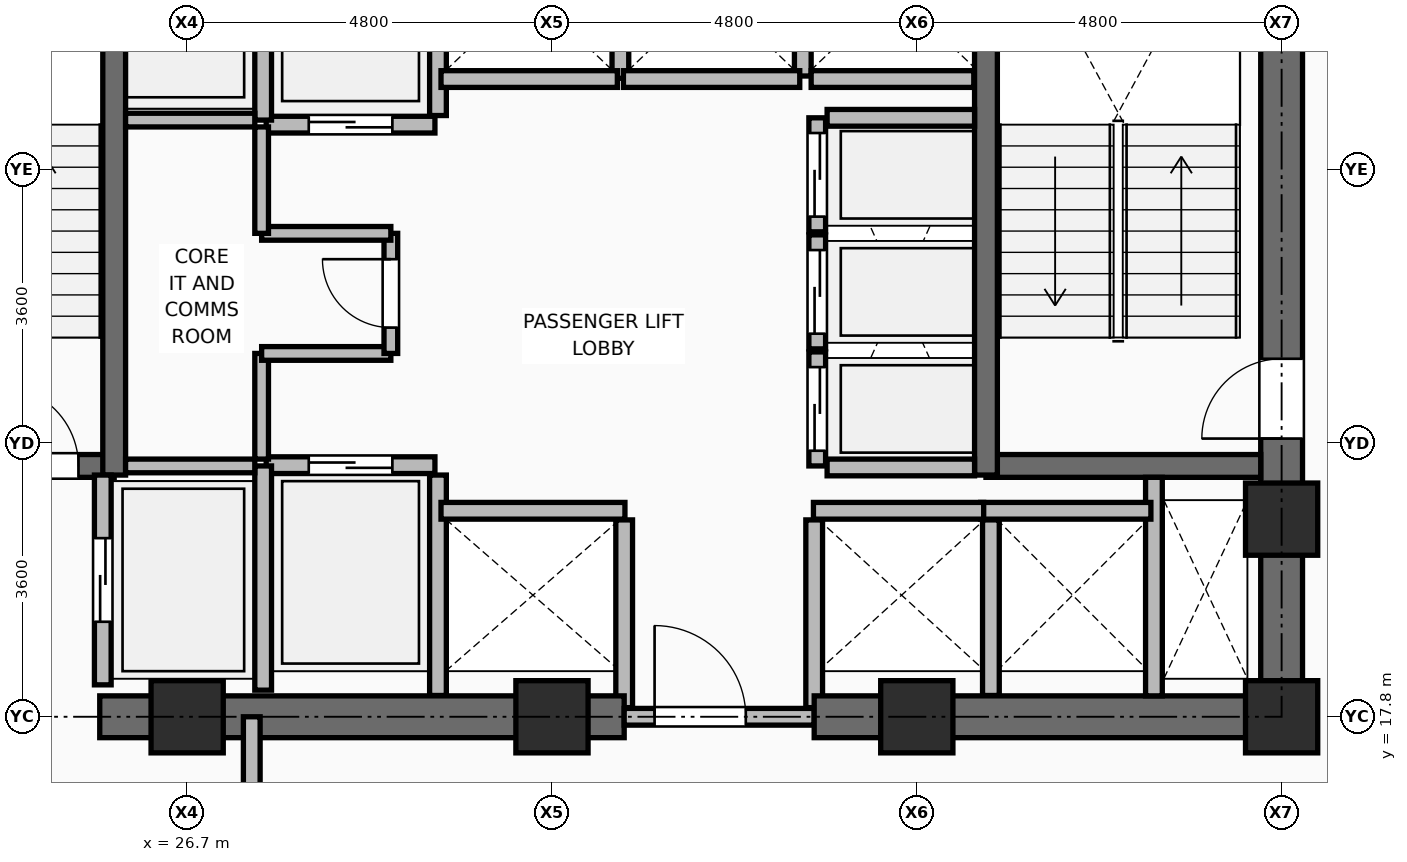
"""IFC4 building model, lengths in metres.
Left out: names, types, materials, properties, quantities, classifications, styles, units other than length and angle.
Written with IfcOpenShell. Run it as: python <this file> out.ifc"""

import sys

from ifc_helpers import new_model, si_unit, direction, frame, frame_2d, origin, origin_2d, place, context, subcontext, project, spatial, rectangle, extrude, element, fill, save


model = new_model("IFC4")
c1 = context("Model", 3, precision=1e-05, world=origin(), true_north=direction((0.0, 1.0)))
c2 = subcontext(c1, "Body", "Model", "MODEL_VIEW")
j1 = project(units=[si_unit("LENGTHUNIT", "METRE"), si_unit("PLANEANGLEUNIT", "RADIAN")], contexts=[c1])
p1 = place(None, origin())
s1 = spatial("IfcSite", under=j1, at=p1, CompositionType="ELEMENT")
p2 = place(p1, origin())
s2 = spatial("IfcBuilding", under=s1, at=p2, CompositionType="ELEMENT")
p3 = place(p2, frame((0.0, 0.0, 168.45)))
s3 = spatial("IfcBuildingStorey", under=s2, at=p3, CompositionType="ELEMENT", Elevation=168.45)
for number, where, z_axis, x_axis in (
    (1, (26.7, 17.8, 0.0), (0.0, 0.0, 1.0), (1.0, 0.0, 0.0)),
    (2, (31.5, 17.8, 0.0), (0.0, 0.0, 1.0), (1.0, 0.0, 0.0)),
    (3, (36.3, 17.8, 0.0), (0.0, 0.0, 1.0), (1.0, 0.0, 0.0)),
    (4, (41.1, 17.8, 0.0), (0.0, 0.0, 1.0), (1.0, 0.0, 0.0)),
    (5, (41.1, 20.4, 0.0), (0.0, 0.0, 1.0), (1.0, 0.0, 0.0)),
):
    element("IfcColumn", number, at=place(p3, frame(where, z_axis=z_axis, x_axis=x_axis)), inside=s3, PredefinedType="COLUMN", context=c2, shape_type="SweptSolid", body=[
        extrude(rectangle(XDim=0.95, YDim=0.95, at=origin_2d()), origin(), (0.0, 0.0, 1.0), 3.75),
    ])
p4 = place(p3, frame((30.0, 18.08, 0.0), z_axis=(0.0, 0.0, 1.0), x_axis=(0.0, 1.0, 0.0)))
e6 = element("IfcWall", 6, at=p4, inside=s3, PredefinedType="PARTITIONING", context=c2, shape_type="SweptSolid", body=[
    extrude(rectangle(XDim=2.9, YDim=0.22, at=frame_2d((1.45, 0.0))), origin(), (0.0, 0.0, 1.0), 3.545),
])
for number, where, z_axis, x_axis in (
    (7, (32.45, 17.92, 0.0), (0.0, 0.0, 1.0), (0.0, 1.0, 0.0)),
    (8, (34.95, 17.92, 0.0), (0.0, 0.0, 1.0), (0.0, 1.0, 0.0)),
):
    element("IfcWall", number, at=place(p3, frame(where, z_axis=z_axis, x_axis=x_axis)), inside=s3, PredefinedType="PARTITIONING", context=c2, shape_type="SweptSolid", body=[
        extrude(rectangle(XDim=2.47, YDim=0.22, at=frame_2d((1.235, 0.0))), origin(), (0.0, 0.0, 1.0), 3.006),
    ])
p5 = place(p3, frame((37.275, 18.08, 0.0), z_axis=(0.0, 0.0, 1.0), x_axis=(0.0, 1.0, 0.0)))
e9 = element("IfcWall", 9, at=p5, inside=s3, PredefinedType="PARTITIONING", context=c2, shape_type="SweptSolid", body=[
    extrude(rectangle(XDim=2.31, YDim=0.22, at=frame_2d((1.155, 0.0))), origin(), (0.0, 0.0, 1.0), 3.545),
])
p6 = place(p3, frame((30.0, 25.71, 0.0), z_axis=(0.0, 0.0, 1.0), x_axis=(0.0, 1.0, 0.0)))
e10 = element("IfcWall", 10, at=p6, inside=s3, PredefinedType="PARTITIONING", context=c2, shape_type="SweptSolid", body=[
    extrude(rectangle(XDim=2.73, YDim=0.22, at=frame_2d((1.365, 0.0))), origin(), (0.0, 0.0, 1.0), 3.545),
])
p7 = place(p3, frame((32.4, 26.2, 0.0), z_axis=(0.0, 0.0, 1.0), x_axis=(0.0, 1.0, 0.0)))
e11 = element("IfcWall", 11, at=p7, inside=s3, PredefinedType="PARTITIONING", context=c2, shape_type="SweptSolid", body=[
    extrude(rectangle(XDim=2.24, YDim=0.22, at=frame_2d((1.12, 0.0))), origin(), (0.0, 0.0, 1.0), 3.545),
])
p8 = place(p3, frame((34.8, 26.23, 0.0), z_axis=(0.0, 0.0, 1.0), x_axis=(0.0, 1.0, 0.0)))
e12 = element("IfcWall", 12, at=p8, inside=s3, PredefinedType="PARTITIONING", context=c2, shape_type="SweptSolid", body=[
    extrude(rectangle(XDim=2.21, YDim=0.22, at=frame_2d((1.105, 0.0))), origin(), (0.0, 0.0, 1.0), 3.545),
])
p9 = place(p3, frame((34.91, 26.19, 0.0), z_axis=(0.0, 0.0, 1.0), x_axis=(1.0, 0.0, 0.0)))
e13 = element("IfcWall", 13, at=p9, inside=s3, PredefinedType="PARTITIONING", context=c2, shape_type="SweptSolid", body=[
    extrude(rectangle(XDim=2.14, YDim=0.22, at=frame_2d((1.07, 0.0))), origin(), (0.0, 0.0, 1.0), 3.545),
])
p10 = place(p3, frame((25.55, 17.8, 0.0), z_axis=(0.0, 0.0, 1.0), x_axis=(1.0, 0.0, 0.0)))
e14 = element("IfcWall", 14, at=p10, inside=s3, PredefinedType="SHEAR", context=c2, shape_type="SweptSolid", body=[
    extrude(rectangle(XDim=6.9, YDim=0.55, at=frame_2d((3.45, 0.0))), origin(), (0.0, 0.0, 1.0), 3.57),
])
p11 = place(p3, frame((32.45, 17.8, 0.0), z_axis=(0.0, 0.0, 1.0), x_axis=(1.0, 0.0, 0.0)))
e15 = element("IfcWall", 15, at=p11, inside=s3, PredefinedType="PARTITIONING", context=c2, shape_type="SweptSolid", body=[
    extrude(rectangle(XDim=2.5, YDim=0.22, at=frame_2d((1.25, 0.0))), origin(), (0.0, 0.0, 1.0), 3.006),
])
p12 = place(p11, frame((0.4, 0.0, 0.0)))
e16 = element("IfcOpeningElement", 16, at=p12, cuts=e15, PredefinedType="OPENING", context=c2, shape_type="SweptSolid", body=[
    extrude(rectangle(XDim=1.2, YDim=2.1, at=frame_2d((0.6, 1.05))), frame((0.0, 0.12, 0.0), z_axis=(0.0, -1.0, 0.0), x_axis=(1.0, 0.0, 0.0)), (0.0, 0.0, 1.0), 0.24),
])
p13 = place(p3, frame((34.95, 17.8, 0.0), z_axis=(0.0, 0.0, 1.0), x_axis=(1.0, 0.0, 0.0)))
e17 = element("IfcWall", 17, at=p13, inside=s3, PredefinedType="SHEAR", context=c2, shape_type="SweptSolid", body=[
    extrude(rectangle(XDim=6.425, YDim=0.55, at=frame_2d((3.212, 0.0))), origin(), (0.0, 0.0, 1.0), 3.57),
])
p14 = place(p3, frame((41.1, 18.075, 0.0), z_axis=(0.0, 0.0, 1.0), x_axis=(0.0, 1.0, 0.0)))
e18 = element("IfcWall", 18, at=p14, inside=s3, PredefinedType="SHEAR", context=c2, shape_type="SweptSolid", body=[
    extrude(rectangle(XDim=14.1, YDim=0.55, at=frame_2d((7.05, 0.0))), origin(), (0.0, 0.0, 1.0), 3.57),
])
p15 = place(p14, frame((3.385, 0.0, 0.0)))
e19 = element("IfcOpeningElement", 19, at=p15, cuts=e18, PredefinedType="OPENING", context=c2, shape_type="SweptSolid", body=[
    extrude(rectangle(XDim=1.05, YDim=2.1, at=frame_2d((0.525, 1.05))), frame((0.0, 0.285, 0.0), z_axis=(0.0, -1.0, 0.0), x_axis=(1.0, 0.0, 0.0)), (0.0, 0.0, 1.0), 0.57),
])
p16 = place(p3, frame((22.175, 21.1, 0.0), z_axis=(0.0, 0.0, 1.0), x_axis=(1.0, 0.0, 0.0)))
e20 = element("IfcWall", 20, at=p16, inside=s3, PredefinedType="SHEAR", context=c2, shape_type="SweptSolid", body=[
    extrude(rectangle(XDim=3.565, YDim=0.3, at=frame_2d((1.782, 0.0))), origin(), (0.0, 0.0, 1.0), 3.57),
])
p17 = place(p16, frame((2.045, 0.0, 0.0)))
e21 = element("IfcOpeningElement", 21, at=p17, cuts=e20, PredefinedType="OPENING", context=c2, shape_type="SweptSolid", body=[
    extrude(rectangle(XDim=1.05, YDim=2.1, at=frame_2d((0.525, 1.05))), frame((0.0, 0.16, 0.0), z_axis=(0.0, -1.0, 0.0), x_axis=(1.0, 0.0, 0.0)), (0.0, 0.0, 1.0), 0.32),
])
p18 = place(p3, frame((25.74, 20.98, 0.0), z_axis=(0.0, 0.0, 1.0), x_axis=(0.0, 1.0, 0.0)))
e22 = element("IfcWall", 22, at=p18, inside=s3, PredefinedType="SHEAR", context=c2, shape_type="SweptSolid", body=[
    extrude(rectangle(XDim=7.99, YDim=0.3, at=frame_2d((3.995, 0.0))), origin(), (0.0, 0.0, 1.0), 3.57),
])
p19 = place(p3, frame((37.21, 21.1, 0.0), z_axis=(0.0, 0.0, 1.0), x_axis=(1.0, 0.0, 0.0)))
e23 = element("IfcWall", 23, at=p19, inside=s3, PredefinedType="SHEAR", context=c2, shape_type="SweptSolid", body=[
    extrude(rectangle(XDim=3.615, YDim=0.3, at=frame_2d((1.808, 0.0))), origin(), (0.0, 0.0, 1.0), 3.57),
])
p20 = place(p3, frame((37.21, 20.98, 0.0), z_axis=(0.0, 0.0, 1.0), x_axis=(0.0, 1.0, 0.0)))
e24 = element("IfcWall", 24, at=p20, inside=s3, PredefinedType="SHEAR", context=c2, shape_type="SweptSolid", body=[
    extrude(rectangle(XDim=7.99, YDim=0.3, at=frame_2d((3.995, 0.0))), origin(), (0.0, 0.0, 1.0), 3.57),
])
p21 = place(p3, frame((39.42, 18.075, 0.0), z_axis=(0.0, 0.0, 1.0), x_axis=(0.0, 1.0, 0.0)))
e25 = element("IfcWall", 25, at=p21, inside=s3, PredefinedType="PARTITIONING", context=c2, shape_type="SweptSolid", body=[
    extrude(rectangle(XDim=2.875, YDim=0.22, at=frame_2d((1.438, 0.0))), origin(), (0.0, 0.0, 1.0), 3.55),
])
p22 = place(p3, frame((25.59, 18.22, 0.0), z_axis=(0.0, 0.0, 1.0), x_axis=(0.0, 1.0, 0.0)))
e26 = element("IfcWall", 26, at=p22, inside=s3, PredefinedType="PARTITIONING", context=c2, shape_type="SweptSolid", body=[
    extrude(rectangle(XDim=2.76, YDim=0.22, at=frame_2d((1.38, 0.0))), origin(), (0.0, 0.0, 1.0), 3.55),
])
p23 = place(p22, frame((0.83, 0.0, 0.0)))
e27 = element("IfcOpeningElement", 27, at=p23, cuts=e26, PredefinedType="OPENING", context=c2, shape_type="SweptSolid", body=[
    extrude(rectangle(XDim=1.1, YDim=2.2, at=frame_2d((0.55, 1.1))), frame((0.0, 0.12, 0.0), z_axis=(0.0, -1.0, 0.0), x_axis=(1.0, 0.0, 0.0)), (0.0, 0.0, 1.0), 0.24),
])
p24 = place(p3, frame((27.74, 21.11, 0.0), z_axis=(0.0, 0.0, 1.0), x_axis=(1.0, 0.0, 0.0)))
e28 = element("IfcWall", 28, at=p24, inside=s3, PredefinedType="PARTITIONING", context=c2, shape_type="SweptSolid", body=[
    extrude(rectangle(XDim=2.22, YDim=0.22, at=frame_2d((1.11, 0.0))), origin(), (0.0, 0.0, 1.0), 3.55),
])
p25 = place(p24, frame((0.56, 0.0, 0.0)))
e29 = element("IfcOpeningElement", 29, at=p25, cuts=e28, PredefinedType="OPENING", context=c2, shape_type="SweptSolid", body=[
    extrude(rectangle(XDim=1.1, YDim=2.2, at=frame_2d((0.55, 1.1))), frame((0.0, 0.12, 0.0), z_axis=(0.0, -1.0, 0.0), x_axis=(1.0, 0.0, 0.0)), (0.0, 0.0, 1.0), 0.24),
])
p26 = place(p3, frame((27.74, 25.59, 0.0), z_axis=(0.0, 0.0, 1.0), x_axis=(1.0, 0.0, 0.0)))
e30 = element("IfcWall", 30, at=p26, inside=s3, PredefinedType="PARTITIONING", context=c2, shape_type="SweptSolid", body=[
    extrude(rectangle(XDim=2.22, YDim=0.22, at=frame_2d((1.11, 0.0))), origin(), (0.0, 0.0, 1.0), 3.55),
])
p27 = place(p26, frame((0.56, 0.0, 0.0)))
e31 = element("IfcOpeningElement", 31, at=p27, cuts=e30, PredefinedType="OPENING", context=c2, shape_type="SweptSolid", body=[
    extrude(rectangle(XDim=1.1, YDim=2.2, at=frame_2d((0.55, 1.1))), frame((0.0, 0.12, 0.0), z_axis=(0.0, -1.0, 0.0), x_axis=(1.0, 0.0, 0.0)), (0.0, 0.0, 1.0), 0.24),
])
p28 = place(p3, frame((30.04, 20.51, 0.0), z_axis=(0.0, 0.0, 1.0), x_axis=(1.0, 0.0, 0.0)))
e32 = element("IfcWall", 32, at=p28, inside=s3, PredefinedType="PARTITIONING", context=c2, shape_type="SweptSolid", body=[
    extrude(rectangle(XDim=2.42, YDim=0.22, at=frame_2d((1.21, 0.0))), origin(), (0.0, 0.0, 1.0), 3.55),
])
for number, where, z_axis, x_axis in (
    (33, (37.14, 20.51, 0.0), (0.0, 0.0, 1.0), (1.0, 0.0, 0.0)),
    (34, (34.94, 20.51, 0.0), (0.0, 0.0, 1.0), (1.0, 0.0, 0.0)),
):
    element("IfcWall", number, at=place(p3, frame(where, z_axis=z_axis, x_axis=x_axis)), inside=s3, PredefinedType="PARTITIONING", context=c2, shape_type="SweptSolid", body=[
        extrude(rectangle(XDim=2.24, YDim=0.22, at=frame_2d((1.12, 0.0))), origin(), (0.0, 0.0, 1.0), 3.55),
    ])
for number, where, z_axis, x_axis in (
    (35, (30.04, 26.19, 0.0), (0.0, 0.0, 1.0), (1.0, 0.0, 0.0)),
    (36, (32.44, 26.19, 0.0), (0.0, 0.0, 1.0), (1.0, 0.0, 0.0)),
):
    element("IfcWall", number, at=place(p3, frame(where, z_axis=z_axis, x_axis=x_axis)), inside=s3, PredefinedType="PARTITIONING", context=c2, shape_type="SweptSolid", body=[
        extrude(rectangle(XDim=2.32, YDim=0.22, at=frame_2d((1.16, 0.0))), origin(), (0.0, 0.0, 1.0), 3.55),
    ])
p29 = place(p3, frame((34.99, 21.1, 0.0), z_axis=(0.0, 0.0, 1.0), x_axis=(0.0, 1.0, 0.0)))
e37 = element("IfcWall", 37, at=p29, inside=s3, PredefinedType="PARTITIONING", context=c2, shape_type="SweptSolid", body=[
    extrude(rectangle(XDim=1.5, YDim=0.22, at=frame_2d((0.75, 0.0))), origin(), (0.0, 0.0, 1.0), 3.55),
])
p30 = place(p29, frame((0.2, 0.0, 0.0)))
e38 = element("IfcOpeningElement", 38, at=p30, cuts=e37, PredefinedType="OPENING", context=c2, shape_type="SweptSolid", body=[
    extrude(rectangle(XDim=1.1, YDim=2.2, at=frame_2d((0.55, 1.1))), frame((0.0, 0.12, 0.0), z_axis=(0.0, -1.0, 0.0), x_axis=(1.0, 0.0, 0.0)), (0.0, 0.0, 1.0), 0.24),
])
p31 = place(p3, frame((34.99, 22.64, 0.0), z_axis=(0.0, 0.0, 1.0), x_axis=(0.0, 1.0, 0.0)))
e39 = element("IfcWall", 39, at=p31, inside=s3, PredefinedType="PARTITIONING", context=c2, shape_type="SweptSolid", body=[
    extrude(rectangle(XDim=1.5, YDim=0.22, at=frame_2d((0.75, 0.0))), origin(), (0.0, 0.0, 1.0), 3.55),
])
p32 = place(p31, frame((0.2, 0.0, 0.0)))
e40 = element("IfcOpeningElement", 40, at=p32, cuts=e39, PredefinedType="OPENING", context=c2, shape_type="SweptSolid", body=[
    extrude(rectangle(XDim=1.1, YDim=2.2, at=frame_2d((0.55, 1.1))), frame((0.0, 0.12, 0.0), z_axis=(0.0, -1.0, 0.0), x_axis=(1.0, 0.0, 0.0)), (0.0, 0.0, 1.0), 0.24),
])
p33 = place(p3, frame((34.99, 24.18, 0.0), z_axis=(0.0, 0.0, 1.0), x_axis=(0.0, 1.0, 0.0)))
e41 = element("IfcWall", 41, at=p33, inside=s3, PredefinedType="PARTITIONING", context=c2, shape_type="SweptSolid", body=[
    extrude(rectangle(XDim=1.5, YDim=0.22, at=frame_2d((0.75, 0.0))), origin(), (0.0, 0.0, 1.0), 3.55),
])
p34 = place(p33, frame((0.2, 0.0, 0.0)))
e42 = element("IfcOpeningElement", 42, at=p34, cuts=e41, PredefinedType="OPENING", context=c2, shape_type="SweptSolid", body=[
    extrude(rectangle(XDim=1.1, YDim=2.2, at=frame_2d((0.55, 1.1))), frame((0.0, 0.12, 0.0), z_axis=(0.0, -1.0, 0.0), x_axis=(1.0, 0.0, 0.0)), (0.0, 0.0, 1.0), 0.24),
])
p35 = place(p3, frame((27.7, 18.15, 0.0), z_axis=(0.0, 0.0, 1.0), x_axis=(0.0, 1.0, 0.0)))
e43 = element("IfcWall", 43, at=p35, inside=s3, PredefinedType="PARTITIONING", context=c2, shape_type="SweptSolid", body=[
    extrude(rectangle(XDim=2.95, YDim=0.22, at=frame_2d((1.475, 0.0))), origin(), (0.0, 0.0, 1.0), 3.55),
])
p36 = place(p3, frame((27.7, 25.65, 0.0), z_axis=(0.0, 0.0, 1.0), x_axis=(0.0, 1.0, 0.0)))
e44 = element("IfcWall", 44, at=p36, inside=s3, PredefinedType="PARTITIONING", context=c2, shape_type="SweptSolid", body=[
    extrude(rectangle(XDim=3.0, YDim=0.22, at=frame_2d((1.5, 0.0))), origin(), (0.0, 0.0, 1.0), 3.55),
])
for number, where, z_axis, x_axis in (
    (45, (35.12, 21.08, 0.0), (0.0, 0.0, 1.0), (1.0, 0.0, 0.0)),
    (46, (35.12, 25.68, 0.0), (0.0, 0.0, 1.0), (1.0, 0.0, 0.0)),
):
    element("IfcWall", number, at=place(p3, frame(where, z_axis=z_axis, x_axis=x_axis)), inside=s3, PredefinedType="PARTITIONING", context=c2, shape_type="SweptSolid", body=[
        extrude(rectangle(XDim=1.94, YDim=0.22, at=frame_2d((0.97, 0.0))), origin(), (0.0, 0.0, 1.0), 3.55),
    ])
for number, where, z_axis, x_axis in (
    (47, (25.89, 21.1, 0.0), (0.0, 0.0, 1.0), (1.0, 0.0, 0.0)),
    (48, (25.89, 25.65, 0.0), (0.0, 0.0, 1.0), (1.0, 0.0, 0.0)),
):
    element("IfcWall", number, at=place(p3, frame(where, z_axis=z_axis, x_axis=x_axis)), inside=s3, PredefinedType="PARTITIONING", context=c2, shape_type="SweptSolid", body=[
        extrude(rectangle(XDim=1.7, YDim=0.18, at=frame_2d((0.85, 0.0))), origin(), (0.0, 0.0, 1.0), 3.55),
    ])
p37 = place(p3, frame((27.68, 21.19, 0.0), z_axis=(0.0, 0.0, 1.0), x_axis=(0.0, 1.0, 0.0)))
e49 = element("IfcWall", 49, at=p37, inside=s3, PredefinedType="PARTITIONING", context=c2, shape_type="SweptSolid", body=[
    extrude(rectangle(XDim=1.39, YDim=0.18, at=frame_2d((0.695, 0.0))), origin(), (0.0, 0.0, 1.0), 3.55),
])
p38 = place(p3, frame((27.68, 22.58, 0.0), z_axis=(0.0, 0.0, 1.0), x_axis=(1.0, 0.0, 0.0)))
e50 = element("IfcWall", 50, at=p38, inside=s3, PredefinedType="PARTITIONING", context=c2, shape_type="SweptSolid", body=[
    extrude(rectangle(XDim=1.7, YDim=0.18, at=frame_2d((0.85, 0.0))), origin(), (0.0, 0.0, 1.0), 3.55),
])
p39 = place(p3, frame((29.38, 22.58, 0.0), z_axis=(0.0, 0.0, 1.0), x_axis=(0.0, 1.0, 0.0)))
e51 = element("IfcWall", 51, at=p39, inside=s3, PredefinedType="PARTITIONING", context=c2, shape_type="SweptSolid", body=[
    extrude(rectangle(XDim=1.58, YDim=0.18, at=frame_2d((0.79, 0.0))), origin(), (0.0, 0.0, 1.0), 3.55),
])
p40 = place(p39, frame((0.34, 0.0, 0.0)))
e52 = element("IfcOpeningElement", 52, at=p40, cuts=e51, PredefinedType="OPENING", context=c2, shape_type="SweptSolid", body=[
    extrude(rectangle(XDim=0.9, YDim=2.1, at=frame_2d((0.45, 1.05))), frame((0.0, 0.1, 0.0), z_axis=(0.0, -1.0, 0.0), x_axis=(1.0, 0.0, 0.0)), (0.0, 0.0, 1.0), 0.2),
])
p41 = place(p3, frame((27.68, 24.16, 0.0), z_axis=(0.0, 0.0, 1.0), x_axis=(1.0, 0.0, 0.0)))
e53 = element("IfcWall", 53, at=p41, inside=s3, PredefinedType="PARTITIONING", context=c2, shape_type="SweptSolid", body=[
    extrude(rectangle(XDim=1.7, YDim=0.18, at=frame_2d((0.85, 0.0))), origin(), (0.0, 0.0, 1.0), 3.55),
])
p42 = place(p3, frame((27.68, 24.16, 0.0), z_axis=(0.0, 0.0, 1.0), x_axis=(0.0, 1.0, 0.0)))
e54 = element("IfcWall", 54, at=p42, inside=s3, PredefinedType="PARTITIONING", context=c2, shape_type="SweptSolid", body=[
    extrude(rectangle(XDim=1.4, YDim=0.18, at=frame_2d((0.7, 0.0))), origin(), (0.0, 0.0, 1.0), 3.55),
])
p43 = place(p3, frame((27.55, 14.35, 0.0), z_axis=(0.0, 0.0, 1.0), x_axis=(0.0, 1.0, 0.0)))
e55 = element("IfcWall", 55, at=p43, inside=s3, PredefinedType="PARTITIONING", context=c2, shape_type="SweptSolid", body=[
    extrude(rectangle(XDim=3.45, YDim=0.22, at=frame_2d((1.725, 0.0))), origin(), (0.0, 0.0, 1.0), 3.006),
])
p44 = place(p43, frame((1.175, 0.0, 0.0)))
e56 = element("IfcOpeningElement", 56, at=p44, cuts=e55, PredefinedType="OPENING", context=c2, shape_type="SweptSolid", body=[
    extrude(rectangle(XDim=1.1, YDim=2.1, at=frame_2d((0.55, 1.05))), frame((0.0, 0.12, 0.0), z_axis=(0.0, -1.0, 0.0), x_axis=(1.0, 0.0, 0.0)), (0.0, 0.0, 1.0), 0.24),
])
p45 = place(p12, origin())
e57 = element("IfcDoor", 57, at=p45, inside=s3, OperationType="SINGLE_SWING_LEFT", PredefinedType="DOOR", context=c2, shape_type="SweptSolid", body=[
    extrude(rectangle(XDim=1.2, YDim=2.1, at=frame_2d((0.6, 1.05))), frame((0.0, 0.025, 0.0), z_axis=(0.0, -1.0, 0.0), x_axis=(1.0, 0.0, 0.0)), (0.0, 0.0, 1.0), 0.05),
])
fill(e16, e57)
p46 = place(p17, origin())
e58 = element("IfcDoor", 58, at=p46, inside=s3, OperationType="SINGLE_SWING_LEFT", PredefinedType="DOOR", context=c2, shape_type="SweptSolid", body=[
    extrude(rectangle(XDim=1.05, YDim=2.1, at=frame_2d((0.525, 1.05))), frame((0.0, 0.025, 0.0), z_axis=(0.0, -1.0, 0.0), x_axis=(1.0, 0.0, 0.0)), (0.0, 0.0, 1.0), 0.05),
])
fill(e21, e58)
p47 = place(p15, origin())
e59 = element("IfcDoor", 59, at=p47, inside=s3, OperationType="SINGLE_SWING_LEFT", PredefinedType="DOOR", context=c2, shape_type="SweptSolid", body=[
    extrude(rectangle(XDim=1.05, YDim=2.1, at=frame_2d((0.525, 1.05))), frame((0.0, 0.025, 0.0), z_axis=(0.0, -1.0, 0.0), x_axis=(1.0, 0.0, 0.0)), (0.0, 0.0, 1.0), 0.05),
])
fill(e19, e59)
p48 = place(p23, origin())
e60 = element("IfcDoor", 60, at=p48, inside=s3, OperationType="DOUBLE_DOOR_SLIDING", PredefinedType="DOOR", context=c2, shape_type="SweptSolid", body=[
    extrude(rectangle(XDim=1.1, YDim=2.2, at=frame_2d((0.55, 1.1))), frame((0.0, 0.025, 0.0), z_axis=(0.0, -1.0, 0.0), x_axis=(1.0, 0.0, 0.0)), (0.0, 0.0, 1.0), 0.05),
])
fill(e27, e60)
p49 = place(p25, origin())
e61 = element("IfcDoor", 61, at=p49, inside=s3, OperationType="DOUBLE_DOOR_SLIDING", PredefinedType="DOOR", context=c2, shape_type="SweptSolid", body=[
    extrude(rectangle(XDim=1.1, YDim=2.2, at=frame_2d((0.55, 1.1))), frame((0.0, 0.025, 0.0), z_axis=(0.0, -1.0, 0.0), x_axis=(1.0, 0.0, 0.0)), (0.0, 0.0, 1.0), 0.05),
])
fill(e29, e61)
p50 = place(p27, frame((1.1, 0.0, 0.0), z_axis=(0.0, 0.0, 1.0), x_axis=(-1.0, 0.0, 0.0)))
e62 = element("IfcDoor", 62, at=p50, inside=s3, OperationType="DOUBLE_DOOR_SLIDING", PredefinedType="DOOR", context=c2, shape_type="SweptSolid", body=[
    extrude(rectangle(XDim=1.1, YDim=2.2, at=frame_2d((0.55, 1.1))), frame((0.0, 0.025, 0.0), z_axis=(0.0, -1.0, 0.0), x_axis=(1.0, 0.0, 0.0)), (0.0, 0.0, 1.0), 0.05),
])
fill(e31, e62)
p51 = place(p30, origin())
e63 = element("IfcDoor", 63, at=p51, inside=s3, OperationType="DOUBLE_DOOR_SLIDING", PredefinedType="DOOR", context=c2, shape_type="SweptSolid", body=[
    extrude(rectangle(XDim=1.1, YDim=2.2, at=frame_2d((0.55, 1.1))), frame((0.0, 0.025, 0.0), z_axis=(0.0, -1.0, 0.0), x_axis=(1.0, 0.0, 0.0)), (0.0, 0.0, 1.0), 0.05),
])
fill(e38, e63)
p52 = place(p32, origin())
e64 = element("IfcDoor", 64, at=p52, inside=s3, OperationType="DOUBLE_DOOR_SLIDING", PredefinedType="DOOR", context=c2, shape_type="SweptSolid", body=[
    extrude(rectangle(XDim=1.1, YDim=2.2, at=frame_2d((0.55, 1.1))), frame((0.0, 0.025, 0.0), z_axis=(0.0, -1.0, 0.0), x_axis=(1.0, 0.0, 0.0)), (0.0, 0.0, 1.0), 0.05),
])
fill(e40, e64)
p53 = place(p34, origin())
e65 = element("IfcDoor", 65, at=p53, inside=s3, OperationType="DOUBLE_DOOR_SLIDING", PredefinedType="DOOR", context=c2, shape_type="SweptSolid", body=[
    extrude(rectangle(XDim=1.1, YDim=2.2, at=frame_2d((0.55, 1.1))), frame((0.0, 0.025, 0.0), z_axis=(0.0, -1.0, 0.0), x_axis=(1.0, 0.0, 0.0)), (0.0, 0.0, 1.0), 0.05),
])
fill(e42, e65)
p54 = place(p40, origin())
e66 = element("IfcDoor", 66, at=p54, inside=s3, OperationType="SINGLE_SWING_RIGHT", PredefinedType="DOOR", context=c2, shape_type="SweptSolid", body=[
    extrude(rectangle(XDim=0.9, YDim=2.1, at=frame_2d((0.45, 1.05))), frame((0.0, 0.025, 0.0), z_axis=(0.0, -1.0, 0.0), x_axis=(1.0, 0.0, 0.0)), (0.0, 0.0, 1.0), 0.05),
])
fill(e52, e66)
save(model, sys.argv[1])
